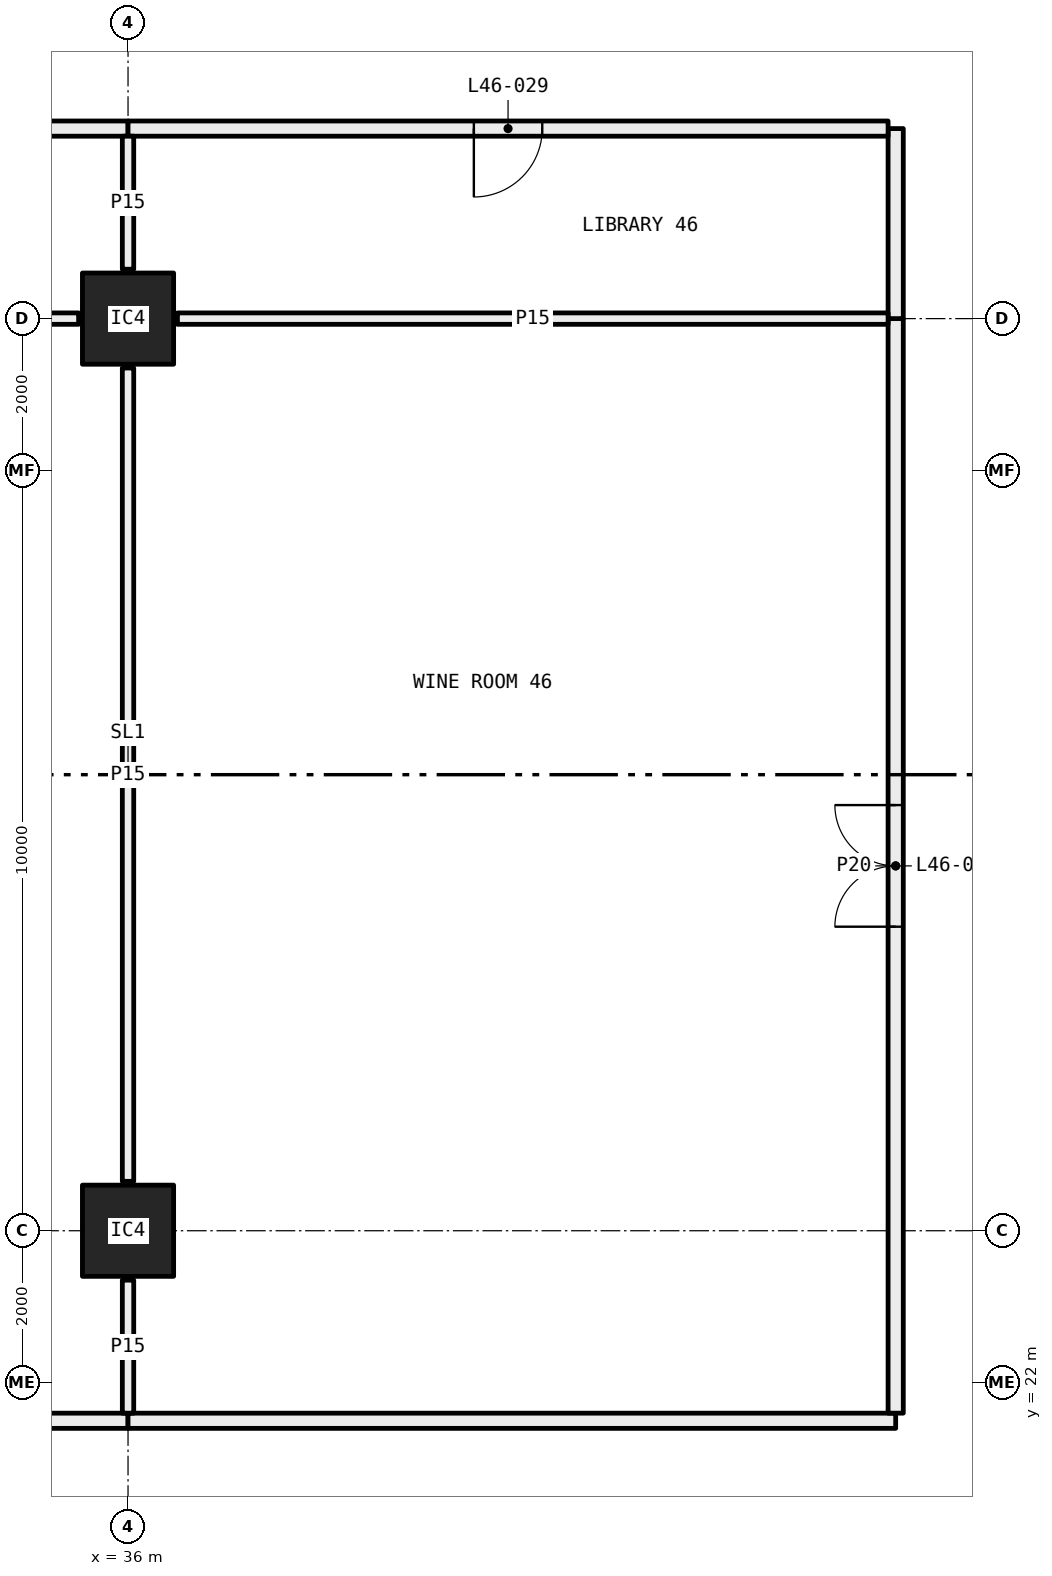
"""IFC4 building model, lengths in metres.
Left out: names, types, materials, properties, quantities, classifications, styles, units other than length and angle.
Written with IfcOpenShell. Run it as: python <this file> out.ifc"""

import sys

from ifc_helpers import new_model, si_unit, direction, frame, frame_2d, origin, origin_2d, place, context, subcontext, project, spatial, rectangle, hollow_rectangle, extrude, element, fill, save


model = new_model("IFC4")
c1 = context("Model", 3, precision=1e-05, world=origin(), true_north=direction((0.0, 1.0)))
c2 = subcontext(c1, "Body", "Model", "MODEL_VIEW")
j1 = project(units=[si_unit("LENGTHUNIT", "METRE"), si_unit("PLANEANGLEUNIT", "RADIAN")], contexts=[c1])
p1 = place(None, origin())
s1 = spatial("IfcSite", under=j1, at=p1, CompositionType="ELEMENT")
p2 = place(p1, origin())
s2 = spatial("IfcBuilding", under=s1, at=p2, CompositionType="ELEMENT")
p3 = place(p2, frame((0.0, 0.0, 175.5)))
s3 = spatial("IfcBuildingStorey", under=s2, at=p3, CompositionType="ELEMENT", Elevation=175.5)
for number, where, z_axis, x_axis in (
    (1, (36.0, 24.0, 0.0), (0.0, 0.0, 1.0), (1.0, 0.0, 0.0)),
    (2, (36.0, 36.0, 0.0), (0.0, 0.0, 1.0), (1.0, 0.0, 0.0)),
):
    element("IfcColumn", number, at=place(p3, frame(where, z_axis=z_axis, x_axis=x_axis)), inside=s3, PredefinedType="COLUMN", context=c2, shape_type="SweptSolid", body=[
        extrude(hollow_rectangle(XDim=1.2, YDim=1.2, WallThickness=0.05, at=origin_2d()), origin(), (0.0, 0.0, 1.0), 3.05),
    ])
p4 = place(p3, frame((26.0, 21.5, 0.0), z_axis=(0.0, 0.0, 1.0), x_axis=(1.0, 0.0, 0.0)))
e3 = element("IfcWall", 3, at=p4, inside=s3, PredefinedType="PARTITIONING", context=c2, shape_type="SweptSolid", body=[
    extrude(rectangle(XDim=10.0, YDim=0.2, at=frame_2d((5.0, 0.0))), origin(), (0.0, 0.0, 1.0), 2.45),
])
p5 = place(p3, frame((36.0, 21.5, 0.0), z_axis=(0.0, 0.0, 1.0), x_axis=(1.0, 0.0, 0.0)))
e4 = element("IfcWall", 4, at=p5, inside=s3, PredefinedType="PARTITIONING", context=c2, shape_type="SweptSolid", body=[
    extrude(rectangle(XDim=10.1, YDim=0.2, at=frame_2d((5.05, 0.0))), origin(), (0.0, 0.0, 1.0), 2.45),
])
p6 = place(p3, frame((46.1, 21.6, 0.0), z_axis=(0.0, 0.0, 1.0), x_axis=(0.0, 1.0, 0.0)))
e5 = element("IfcWall", 5, at=p6, inside=s3, PredefinedType="PARTITIONING", context=c2, shape_type="SweptSolid", body=[
    extrude(rectangle(XDim=14.4, YDim=0.2, at=frame_2d((7.2, 0.0))), origin(), (0.0, 0.0, 1.0), 2.45),
])
p7 = place(p6, frame((6.4, 0.0, 0.0)))
e6 = element("IfcOpeningElement", 6, at=p7, cuts=e5, PredefinedType="OPENING", context=c2, shape_type="SweptSolid", body=[
    extrude(rectangle(XDim=1.6, YDim=2.1, at=frame_2d((0.8, 1.05))), frame((0.0, 0.11, 0.0), z_axis=(0.0, -1.0, 0.0), x_axis=(1.0, 0.0, 0.0)), (0.0, 0.0, 1.0), 0.22),
])
p8 = place(p3, frame((36.0, 38.5, 0.0), z_axis=(0.0, 0.0, 1.0), x_axis=(-1.0, 0.0, 0.0)))
e7 = element("IfcWall", 7, at=p8, inside=s3, PredefinedType="PARTITIONING", context=c2, shape_type="SweptSolid", body=[
    extrude(rectangle(XDim=10.1, YDim=0.2, at=frame_2d((5.05, 0.0))), origin(), (0.0, 0.0, 1.0), 2.45),
])
p9 = place(p8, frame((4.6, 0.0, 0.0)))
e8 = element("IfcOpeningElement", 8, at=p9, cuts=e7, PredefinedType="OPENING", context=c2, shape_type="SweptSolid", body=[
    extrude(rectangle(XDim=0.9, YDim=2.1, at=frame_2d((0.45, 1.05))), frame((0.0, 0.11, 0.0), z_axis=(0.0, -1.0, 0.0), x_axis=(1.0, 0.0, 0.0)), (0.0, 0.0, 1.0), 0.22),
])
p10 = place(p3, frame((46.1, 36.0, 0.0), z_axis=(0.0, 0.0, 1.0), x_axis=(0.0, 1.0, 0.0)))
e9 = element("IfcWall", 9, at=p10, inside=s3, PredefinedType="PARTITIONING", context=c2, shape_type="SweptSolid", body=[
    extrude(rectangle(XDim=2.5, YDim=0.2, at=frame_2d((1.25, 0.0))), origin(), (0.0, 0.0, 1.0), 2.45),
])
p11 = place(p3, frame((46.0, 38.5, 0.0), z_axis=(0.0, 0.0, 1.0), x_axis=(-1.0, 0.0, 0.0)))
e10 = element("IfcWall", 10, at=p11, inside=s3, PredefinedType="PARTITIONING", context=c2, shape_type="SweptSolid", body=[
    extrude(rectangle(XDim=10.0, YDim=0.2, at=frame_2d((5.0, 0.0))), origin(), (0.0, 0.0, 1.0), 2.45),
])
p12 = place(p11, frame((4.55, 0.0, 0.0)))
e11 = element("IfcOpeningElement", 11, at=p12, cuts=e10, PredefinedType="OPENING", context=c2, shape_type="SweptSolid", body=[
    extrude(rectangle(XDim=0.9, YDim=2.1, at=frame_2d((0.45, 1.05))), frame((0.0, 0.11, 0.0), z_axis=(0.0, -1.0, 0.0), x_axis=(1.0, 0.0, 0.0)), (0.0, 0.0, 1.0), 0.22),
])
p13 = place(p3, frame((36.0, 21.6, 0.0), z_axis=(0.0, 0.0, 1.0), x_axis=(0.0, 1.0, 0.0)))
e12 = element("IfcWall", 12, at=p13, inside=s3, PredefinedType="PARTITIONING", context=c2, shape_type="SweptSolid", body=[
    extrude(rectangle(XDim=1.75, YDim=0.15, at=frame_2d((0.875, 0.0))), origin(), (0.0, 0.0, 1.0), 2.45),
])
p14 = place(p3, frame((36.0, 24.65, 0.0), z_axis=(0.0, 0.0, 1.0), x_axis=(0.0, 1.0, 0.0)))
e13 = element("IfcWall", 13, at=p14, inside=s3, PredefinedType="PARTITIONING", context=c2, shape_type="SweptSolid", body=[
    extrude(rectangle(XDim=10.7, YDim=0.15, at=frame_2d((5.35, 0.0))), origin(), (0.0, 0.0, 1.0), 2.45),
])
for number, where, z_axis, x_axis in (
    (14, (35.35, 36.0, 0.0), (0.0, 0.0, 1.0), (-1.0, 0.0, 0.0)),
    (15, (46.0, 36.0, 0.0), (0.0, 0.0, 1.0), (-1.0, 0.0, 0.0)),
):
    element("IfcWall", number, at=place(p3, frame(where, z_axis=z_axis, x_axis=x_axis)), inside=s3, PredefinedType="PARTITIONING", context=c2, shape_type="SweptSolid", body=[
        extrude(rectangle(XDim=9.35, YDim=0.15, at=frame_2d((4.675, 0.0))), origin(), (0.0, 0.0, 1.0), 2.45),
    ])
p15 = place(p3, frame((36.0, 36.65, 0.0), z_axis=(0.0, 0.0, 1.0), x_axis=(0.0, 1.0, 0.0)))
e16 = element("IfcWall", 16, at=p15, inside=s3, PredefinedType="PARTITIONING", context=c2, shape_type="SweptSolid", body=[
    extrude(rectangle(XDim=1.75, YDim=0.15, at=frame_2d((0.875, 0.0))), origin(), (0.0, 0.0, 1.0), 2.45),
])
p16 = place(p7, origin())
e17 = element("IfcDoor", 17, at=p16, inside=s3, OperationType="DOUBLE_DOOR_SINGLE_SWING", PredefinedType="DOOR", context=c2, shape_type="SweptSolid", body=[
    extrude(rectangle(XDim=1.6, YDim=2.1, at=frame_2d((0.8, 1.05))), frame((0.0, 0.025, 0.0), z_axis=(0.0, -1.0, 0.0), x_axis=(1.0, 0.0, 0.0)), (0.0, 0.0, 1.0), 0.05),
])
fill(e6, e17)
p17 = place(p12, origin())
e18 = element("IfcDoor", 18, at=p17, inside=s3, OperationType="SINGLE_SWING_LEFT", PredefinedType="DOOR", context=c2, shape_type="SweptSolid", body=[
    extrude(rectangle(XDim=0.9, YDim=2.1, at=frame_2d((0.45, 1.05))), frame((0.0, 0.025, 0.0), z_axis=(0.0, -1.0, 0.0), x_axis=(1.0, 0.0, 0.0)), (0.0, 0.0, 1.0), 0.05),
])
fill(e11, e18)
save(model, sys.argv[1])
